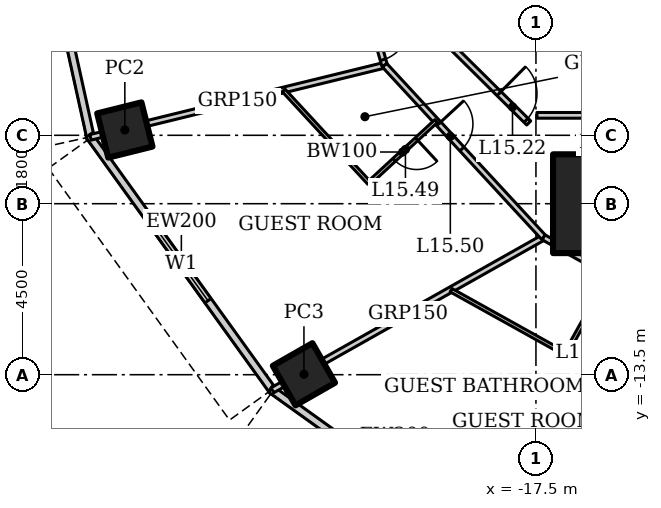
"""IFC4 building model, lengths in metres.
Left out: names, types, materials, properties, quantities, classifications, styles, units other than length and angle.
Written with IfcOpenShell. Run it as: python <this file> out.ifc"""

import sys

from ifc_helpers import new_model, si_unit, direction, frame, frame_2d, origin, origin_2d, place, context, subcontext, project, spatial, rectangle, hollow_rectangle, extrude, element, fill, save


model = new_model("IFC4")
c1 = context("Model", 3, precision=1e-05, world=origin(), true_north=direction((0.0, 1.0)))
c2 = subcontext(c1, "Body", "Model", "MODEL_VIEW")
j1 = project(units=[si_unit("LENGTHUNIT", "METRE"), si_unit("PLANEANGLEUNIT", "RADIAN")], contexts=[c1])
p1 = place(None, origin())
s1 = spatial("IfcSite", under=j1, at=p1, CompositionType="ELEMENT")
p2 = place(p1, origin())
s2 = spatial("IfcBuilding", under=s1, at=p2, CompositionType="ELEMENT")
p3 = place(p2, frame((0.0, 0.0, 69.4)))
s3 = spatial("IfcBuildingStorey", under=s2, at=p3, CompositionType="ELEMENT", Elevation=69.4)
p4 = place(p3, frame((-15.75, -9.0, 0.0), z_axis=(0.0, 0.0, 1.0), x_axis=(1.0, 0.0, 0.0)))
e1 = element("IfcColumn", 1, at=p4, inside=s3, PredefinedType="COLUMN", context=c2, shape_type="SweptSolid", body=[
    extrude(hollow_rectangle(XDim=2.6, YDim=2.6, WallThickness=0.13, at=origin_2d()), origin(), (0.0, 0.0, 1.0), 3.6),
])
p5 = place(p3, frame((-28.318, -7.06, 0.0), z_axis=(0.0, 0.0, 1.0), x_axis=(0.970295726276, 0.2419218956, 0.0)))
e2 = element("IfcColumn", 2, at=p5, inside=s3, PredefinedType="COLUMN", context=c2, shape_type="SweptSolid", body=[
    extrude(hollow_rectangle(XDim=1.2, YDim=1.2, WallThickness=0.1, at=origin_2d()), origin(), (0.0, 0.0, 1.0), 3.6),
])
p6 = place(p3, frame((-23.605, -13.489, 0.0), z_axis=(0.0, 0.0, 1.0), x_axis=(0.86824298017, 0.496139221777, 0.0)))
e3 = element("IfcColumn", 3, at=p6, inside=s3, PredefinedType="COLUMN", context=c2, shape_type="SweptSolid", body=[
    extrude(hollow_rectangle(XDim=1.2, YDim=1.2, WallThickness=0.12, at=origin_2d()), origin(), (0.0, 0.0, 1.0), 3.6),
])
p7 = place(p3, frame((-30.835, 0.067, 0.0), z_axis=(0.0, 0.0, 1.0), x_axis=(0.215238065514, -0.976561608478, 0.0)))
e4 = element("IfcWall", 4, at=p7, inside=s3, PredefinedType="SOLIDWALL", context=c2, shape_type="SweptSolid", body=[
    extrude(rectangle(XDim=7.562, YDim=0.2, at=frame_2d((3.781, 0.0))), origin(), (0.0, 0.0, 1.0), 3.45),
])
p8 = place(p7, frame((2.581, 0.0, 0.5)))
e5 = element("IfcOpeningElement", 5, at=p8, cuts=e4, PredefinedType="OPENING", context=c2, shape_type="SweptSolid", body=[
    extrude(rectangle(XDim=2.4, YDim=2.2, at=frame_2d((1.2, 1.1))), frame((0.0, 0.11, 0.0), z_axis=(0.0, -1.0, 0.0), x_axis=(1.0, 0.0, 0.0)), (0.0, 0.0, 1.0), 0.22),
])
p9 = place(p3, frame((-29.26, -7.2, 0.0), z_axis=(0.0, 0.0, 1.0), x_axis=(0.583937613703, -0.811798536155, 0.0)))
e6 = element("IfcWall", 6, at=p9, inside=s3, PredefinedType="SOLIDWALL", context=c2, shape_type="SweptSolid", body=[
    extrude(rectangle(XDim=8.323, YDim=0.2, at=frame_2d((4.162, 0.0))), origin(), (0.0, 0.0, 1.0), 3.45),
])
p10 = place(p9, frame((2.961, 0.0, 0.5)))
e7 = element("IfcOpeningElement", 7, at=p10, cuts=e6, PredefinedType="OPENING", context=c2, shape_type="SweptSolid", body=[
    extrude(rectangle(XDim=2.4, YDim=2.2, at=frame_2d((1.2, 1.1))), frame((0.0, 0.11, 0.0), z_axis=(0.0, -1.0, 0.0), x_axis=(1.0, 0.0, 0.0)), (0.0, 0.0, 1.0), 0.22),
])
p11 = place(p3, frame((-24.482, -13.875, 0.0), z_axis=(0.0, 0.0, 1.0), x_axis=(0.812791321576, -0.582554948112, 0.0)))
e8 = element("IfcWall", 8, at=p11, inside=s3, PredefinedType="SOLIDWALL", context=c2, shape_type="SweptSolid", body=[
    extrude(rectangle(XDim=8.063, YDim=0.2, at=frame_2d((4.032, 0.0))), origin(), (0.0, 0.0, 1.0), 3.45),
])
p12 = place(p11, frame((2.832, 0.0, 0.5)))
e9 = element("IfcOpeningElement", 9, at=p12, cuts=e8, PredefinedType="OPENING", context=c2, shape_type="SweptSolid", body=[
    extrude(rectangle(XDim=2.4, YDim=2.2, at=frame_2d((1.2, 1.1))), frame((0.0, 0.11, 0.0), z_axis=(0.0, -1.0, 0.0), x_axis=(1.0, 0.0, 0.0)), (0.0, 0.0, 1.0), 0.22),
])
p13 = place(p3, frame((-29.222, -7.254, 0.0), z_axis=(0.0, 0.0, 1.0), x_axis=(0.971235585172, 0.238120637695, 0.0)))
e10 = element("IfcWall", 10, at=p13, inside=s3, PredefinedType="PARTITIONING", context=c2, shape_type="SweptSolid", body=[
    extrude(rectangle(XDim=7.968, YDim=0.15, at=frame_2d((3.984, 0.0))), origin(), (0.0, 0.0, 1.0), 2.333),
])
p14 = place(p3, frame((-24.435, -13.909, 0.0), z_axis=(0.0, 0.0, 1.0), x_axis=(0.871075246657, 0.491149584813, 0.0)))
e11 = element("IfcWall", 11, at=p14, inside=s3, PredefinedType="PARTITIONING", context=c2, shape_type="SweptSolid", body=[
    extrude(rectangle(XDim=8.192, YDim=0.15, at=frame_2d((4.096, 0.0))), origin(), (0.0, 0.0, 1.0), 2.693),
])
p15 = place(p3, frame((-17.97, -18.542, 0.0), z_axis=(0.0, 0.0, 1.0), x_axis=(0.698757291878, 0.715358823981, 0.0)))
e12 = element("IfcWall", 12, at=p15, inside=s3, PredefinedType="PARTITIONING", context=c2, shape_type="SweptSolid", body=[
    extrude(rectangle(XDim=8.177, YDim=0.15, at=frame_2d((4.088, 0.0))), origin(), (0.0, 0.0, 1.0), 2.528),
])
p16 = place(p3, frame((-23.0, 0.0, 0.0), z_axis=(0.0, 0.0, 1.0), x_axis=(0.272386051236, -0.962188047677, 0.0)))
e13 = element("IfcWall", 13, at=p16, inside=s3, PredefinedType="PARTITIONING", context=c2, shape_type="SweptSolid", body=[
    extrude(rectangle(XDim=5.567, YDim=0.15, at=frame_2d((2.783, 0.0))), origin(), (0.0, 0.0, 1.0), 3.45),
])
p17 = place(p16, frame((4.517, 0.0, 0.0)))
e14 = element("IfcOpeningElement", 14, at=p17, cuts=e13, PredefinedType="OPENING", context=c2, shape_type="SweptSolid", body=[
    extrude(rectangle(XDim=0.9, YDim=2.1, at=frame_2d((0.45, 1.05))), frame((0.0, 0.085, 0.0), z_axis=(0.0, -1.0, 0.0), x_axis=(1.0, 0.0, 0.0)), (0.0, 0.0, 1.0), 0.17),
])
p18 = place(p3, frame((-21.484, -5.356, 0.0), z_axis=(0.0, 0.0, 1.0), x_axis=(0.678641806296, -0.734469399463, 0.0)))
e15 = element("IfcWall", 15, at=p18, inside=s3, PredefinedType="PARTITIONING", context=c2, shape_type="SweptSolid", body=[
    extrude(rectangle(XDim=6.166, YDim=0.15, at=frame_2d((3.083, 0.0))), origin(), (0.0, 0.0, 1.0), 3.45),
])
p19 = place(p18, frame((2.1, 0.0, 0.0)))
e16 = element("IfcOpeningElement", 16, at=p19, cuts=e15, PredefinedType="OPENING", context=c2, shape_type="SweptSolid", body=[
    extrude(rectangle(XDim=0.9, YDim=2.1, at=frame_2d((0.45, 1.05))), frame((0.0, 0.085, 0.0), z_axis=(0.0, -1.0, 0.0), x_axis=(1.0, 0.0, 0.0)), (0.0, 0.0, 1.0), 0.17),
])
p20 = place(p3, frame((-17.299, -9.885, 0.0), z_axis=(0.0, 0.0, 1.0), x_axis=(0.873695910579, -0.486472461541, 0.0)))
e17 = element("IfcWall", 17, at=p20, inside=s3, PredefinedType="PARTITIONING", context=c2, shape_type="SweptSolid", body=[
    extrude(rectangle(XDim=5.771, YDim=0.15, at=frame_2d((2.885, 0.0))), origin(), (0.0, 0.0, 1.0), 3.45),
])
p21 = place(p20, frame((2.6, 0.0, 0.0)))
e18 = element("IfcOpeningElement", 18, at=p21, cuts=e17, PredefinedType="OPENING", context=c2, shape_type="SweptSolid", body=[
    extrude(rectangle(XDim=0.9, YDim=2.1, at=frame_2d((0.45, 1.05))), frame((0.0, 0.085, 0.0), z_axis=(0.0, -1.0, 0.0), x_axis=(1.0, 0.0, 0.0)), (0.0, 0.0, 1.0), 0.17),
])
p22 = place(p3, frame((-20.126, -6.825, 0.0), z_axis=(0.0, 0.0, 1.0), x_axis=(-0.73447964986, -0.678630712495, 0.0)))
e19 = element("IfcWall", 19, at=p22, inside=s3, PredefinedType="PARTITIONING", context=c2, shape_type="SweptSolid", body=[
    extrude(rectangle(XDim=2.4, YDim=0.1, at=frame_2d((1.2, 0.0))), origin(), (0.0, 0.0, 1.0), 3.45),
])
p23 = place(p22, frame((0.7, 0.0, 0.0)))
e20 = element("IfcOpeningElement", 20, at=p23, cuts=e19, PredefinedType="OPENING", context=c2, shape_type="SweptSolid", body=[
    extrude(rectangle(XDim=0.8, YDim=2.1, at=frame_2d((0.4, 1.05))), frame((0.0, 0.06, 0.0), z_axis=(0.0, -1.0, 0.0), x_axis=(1.0, 0.0, 0.0)), (0.0, 0.0, 1.0), 0.12),
])
p24 = place(p3, frame((-21.889, -8.454, 0.0), z_axis=(0.0, 0.0, 1.0), x_axis=(-0.678653067823, 0.734458993773, 0.0)))
e21 = element("IfcWall", 21, at=p24, inside=s3, PredefinedType="PARTITIONING", context=c2, shape_type="SweptSolid", body=[
    extrude(rectangle(XDim=3.316, YDim=0.1, at=frame_2d((1.658, 0.0))), origin(), (0.0, 0.0, 1.0), 3.45),
])
p25 = place(p3, frame((-15.552, -10.858, 0.0), z_axis=(0.0, 0.0, 1.0), x_axis=(-0.486445964861, -0.873710663361, 0.0)))
e22 = element("IfcWall", 22, at=p25, inside=s3, PredefinedType="PARTITIONING", context=c2, shape_type="SweptSolid", body=[
    extrude(rectangle(XDim=2.4, YDim=0.1, at=frame_2d((1.2, 0.0))), origin(), (0.0, 0.0, 1.0), 3.45),
])
p26 = place(p25, frame((0.7, 0.0, 0.0)))
e23 = element("IfcOpeningElement", 23, at=p26, cuts=e22, PredefinedType="OPENING", context=c2, shape_type="SweptSolid", body=[
    extrude(rectangle(XDim=0.8, YDim=2.1, at=frame_2d((0.4, 1.05))), frame((0.0, 0.06, 0.0), z_axis=(0.0, -1.0, 0.0), x_axis=(1.0, 0.0, 0.0)), (0.0, 0.0, 1.0), 0.12),
])
p27 = place(p3, frame((-16.719, -12.955, 0.0), z_axis=(0.0, 0.0, 1.0), x_axis=(-0.873676251648, 0.486507766953, 0.0)))
e24 = element("IfcWall", 24, at=p27, inside=s3, PredefinedType="PARTITIONING", context=c2, shape_type="SweptSolid", body=[
    extrude(rectangle(XDim=3.45, YDim=0.1, at=frame_2d((1.725, 0.0))), origin(), (0.0, 0.0, 1.0), 3.45),
])
p28 = place(p3, frame((-19.681, -4.907, 0.0), z_axis=(0.0, 0.0, 1.0), x_axis=(0.710845937688, -0.70334774676, 0.0)))
e25 = element("IfcWall", 25, at=p28, inside=s3, PredefinedType="PARTITIONING", context=c2, shape_type="SweptSolid", body=[
    extrude(rectangle(XDim=2.8, YDim=0.15, at=frame_2d((1.4, 0.0))), origin(), (0.0, 0.0, 1.0), 3.45),
])
p29 = place(p28, frame((1.7, 0.0, 0.0)))
e26 = element("IfcOpeningElement", 26, at=p29, cuts=e25, PredefinedType="OPENING", context=c2, shape_type="SweptSolid", body=[
    extrude(rectangle(XDim=1.0, YDim=2.1, at=frame_2d((0.5, 1.05))), frame((0.0, 0.085, 0.0), z_axis=(0.0, -1.0, 0.0), x_axis=(1.0, 0.0, 0.0)), (0.0, 0.0, 1.0), 0.17),
])
p30 = place(p3, frame((-17.475, -6.675, 0.0), z_axis=(0.0, 0.0, 1.0), x_axis=(1.0, 0.0, 0.0)))
e27 = element("IfcWall", 27, at=p30, inside=s3, PredefinedType="PARTITIONING", context=c2, shape_type="SweptSolid", body=[
    extrude(rectangle(XDim=3.245, YDim=0.15, at=frame_2d((1.622, 0.0))), origin(), (0.0, 0.0, 1.0), 3.45),
])
p31 = place(p10, origin())
e28 = element("IfcWindow", 28, at=p31, inside=s3, PartitioningType="SINGLE_PANEL", PredefinedType="WINDOW", context=c2, shape_type="SweptSolid", body=[
    extrude(rectangle(XDim=2.4, YDim=2.2, at=frame_2d((1.2, 1.1))), frame((0.0, 0.03, 0.0), z_axis=(0.0, -1.0, 0.0), x_axis=(1.0, 0.0, 0.0)), (0.0, 0.0, 1.0), 0.06),
])
fill(e7, e28)
p32 = place(p29, origin())
e29 = element("IfcDoor", 29, at=p32, inside=s3, OperationType="SINGLE_SWING_LEFT", PredefinedType="DOOR", context=c2, shape_type="SweptSolid", body=[
    extrude(rectangle(XDim=1.0, YDim=2.1, at=frame_2d((0.5, 1.05))), frame((0.0, 0.025, 0.0), z_axis=(0.0, -1.0, 0.0), x_axis=(1.0, 0.0, 0.0)), (0.0, 0.0, 1.0), 0.05),
])
fill(e26, e29)
p33 = place(p17, origin())
e30 = element("IfcDoor", 30, at=p33, inside=s3, OperationType="SINGLE_SWING_LEFT", PredefinedType="DOOR", context=c2, shape_type="SweptSolid", body=[
    extrude(rectangle(XDim=0.9, YDim=2.1, at=frame_2d((0.45, 1.05))), frame((0.0, 0.025, 0.0), z_axis=(0.0, -1.0, 0.0), x_axis=(1.0, 0.0, 0.0)), (0.0, 0.0, 1.0), 0.05),
])
fill(e14, e30)
p34 = place(p23, origin())
e31 = element("IfcDoor", 31, at=p34, inside=s3, OperationType="SINGLE_SWING_LEFT", PredefinedType="DOOR", context=c2, shape_type="SweptSolid", body=[
    extrude(rectangle(XDim=0.8, YDim=2.1, at=frame_2d((0.4, 1.05))), frame((0.0, 0.025, 0.0), z_axis=(0.0, -1.0, 0.0), x_axis=(1.0, 0.0, 0.0)), (0.0, 0.0, 1.0), 0.05),
])
fill(e20, e31)
p35 = place(p19, origin())
e32 = element("IfcDoor", 32, at=p35, inside=s3, OperationType="SINGLE_SWING_LEFT", PredefinedType="DOOR", context=c2, shape_type="SweptSolid", body=[
    extrude(rectangle(XDim=0.9, YDim=2.1, at=frame_2d((0.45, 1.05))), frame((0.0, 0.025, 0.0), z_axis=(0.0, -1.0, 0.0), x_axis=(1.0, 0.0, 0.0)), (0.0, 0.0, 1.0), 0.05),
])
fill(e16, e32)
p36 = place(p26, origin())
e33 = element("IfcDoor", 33, at=p36, inside=s3, OperationType="SINGLE_SWING_LEFT", PredefinedType="DOOR", context=c2, shape_type="SweptSolid", body=[
    extrude(rectangle(XDim=0.8, YDim=2.1, at=frame_2d((0.4, 1.05))), frame((0.0, 0.025, 0.0), z_axis=(0.0, -1.0, 0.0), x_axis=(1.0, 0.0, 0.0)), (0.0, 0.0, 1.0), 0.05),
])
fill(e23, e33)
save(model, sys.argv[1])
